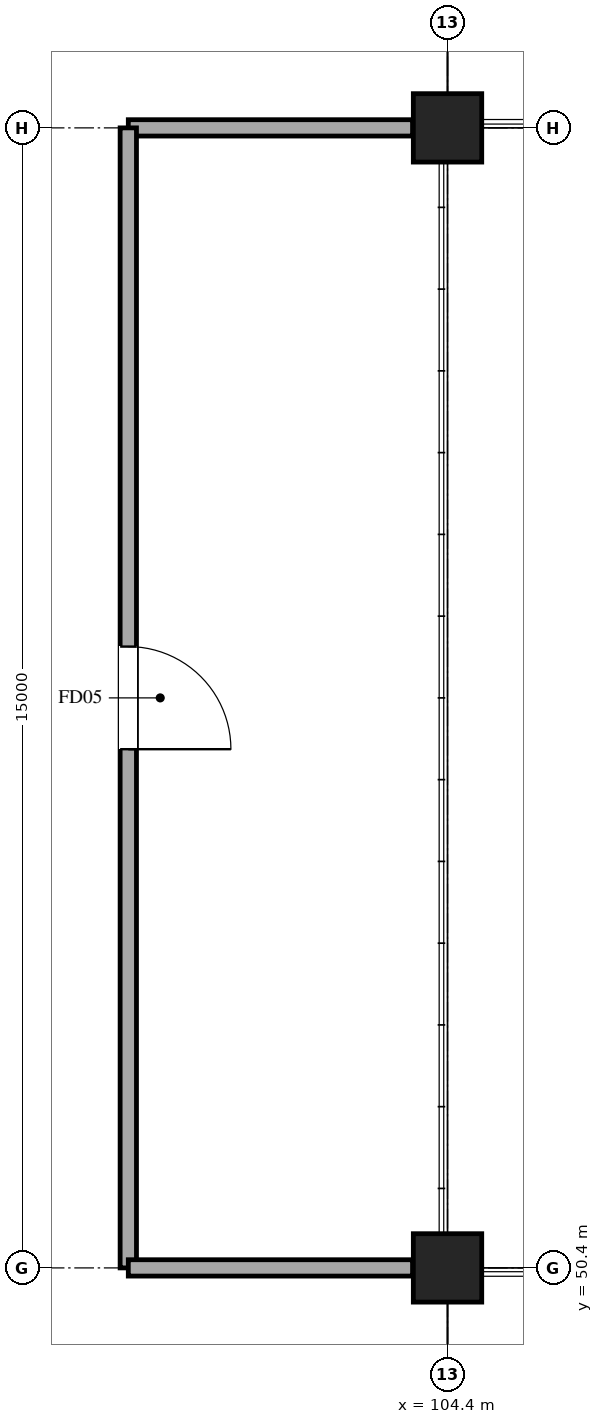
"""IFC4 building model, lengths in metres.
Left out: names, types, materials, properties, quantities, classifications, styles, units other than length and angle.
Written with IfcOpenShell. Run it as: python <this file> out.ifc"""

import sys

from ifc_helpers import new_model, si_unit, direction, frame, frame_2d, origin, origin_2d, place, context, subcontext, project, spatial, rectangle, extrude, element, fill, save


model = new_model("IFC4")
c1 = context("Model", 3, precision=1e-05, world=origin(), true_north=direction((0.0, 1.0)))
c2 = subcontext(c1, "Body", "Model", "MODEL_VIEW")
j1 = project(units=[si_unit("LENGTHUNIT", "METRE"), si_unit("PLANEANGLEUNIT", "RADIAN")], contexts=[c1])
p1 = place(None, origin())
s1 = spatial("IfcSite", under=j1, at=p1, CompositionType="ELEMENT")
p2 = place(p1, origin())
s2 = spatial("IfcBuilding", under=s1, at=p2, CompositionType="ELEMENT")
p3 = place(p2, frame((0.0, 0.0, 11.4)))
s3 = spatial("IfcBuildingStorey", under=s2, at=p3, CompositionType="ELEMENT", Elevation=11.4)
for number, where, z_axis, x_axis in (
    (1, (104.4, 50.4, 0.0), (0.0, 0.0, 1.0), (1.0, 0.0, 0.0)),
    (2, (104.4, 65.4, 0.0), (0.0, 0.0, 1.0), (1.0, 0.0, 0.0)),
):
    element("IfcColumn", number, at=place(p3, frame(where, z_axis=z_axis, x_axis=x_axis)), inside=s3, PredefinedType="COLUMN", context=c2, shape_type="SweptSolid", body=[
        extrude(rectangle(XDim=0.9, YDim=0.9, at=origin_2d()), origin(), (0.0, 0.0, 1.0), 5.1),
    ])
p4 = place(p3, frame((103.94, 65.4, 0.0), z_axis=(0.0, 0.0, 1.0), x_axis=(-1.0, 0.0, 0.0)))
e3 = element("IfcWall", 3, at=p4, inside=s3, PredefinedType="PARTITIONING", context=c2, shape_type="SweptSolid", body=[
    extrude(rectangle(XDim=3.74, YDim=0.215, at=frame_2d((1.87, 0.0))), origin(), (0.0, 0.0, 1.0), 3.86),
])
p5 = place(p3, frame((100.2, 65.4, 0.0), z_axis=(0.0, 0.0, 1.0), x_axis=(0.0, -1.0, 0.0)))
e4 = element("IfcWall", 4, at=p5, inside=s3, PredefinedType="PARTITIONING", context=c2, shape_type="SweptSolid", body=[
    extrude(rectangle(XDim=15.0, YDim=0.215, at=frame_2d((7.5, 0.0))), origin(), (0.0, 0.0, 1.0), 3.86),
])
p6 = place(p5, frame((6.825, 0.0, 0.0)))
e5 = element("IfcOpeningElement", 5, at=p6, cuts=e4, PredefinedType="OPENING", context=c2, shape_type="SweptSolid", body=[
    extrude(rectangle(XDim=1.35, YDim=2.2, at=frame_2d((0.675, 1.1))), frame((0.0, 0.118, 0.0), z_axis=(0.0, -1.0, 0.0), x_axis=(1.0, 0.0, 0.0)), (0.0, 0.0, 1.0), 0.235),
])
p7 = place(p3, frame((100.2, 50.4, 0.0), z_axis=(0.0, 0.0, 1.0), x_axis=(1.0, 0.0, 0.0)))
e6 = element("IfcWall", 6, at=p7, inside=s3, PredefinedType="PARTITIONING", context=c2, shape_type="SweptSolid", body=[
    extrude(rectangle(XDim=3.74, YDim=0.215, at=frame_2d((1.87, 0.0))), origin(), (0.0, 0.0, 1.0), 3.86),
])
p8 = place(p6, origin())
e7 = element("IfcDoor", 7, at=p8, inside=s3, OperationType="SINGLE_SWING_RIGHT", PredefinedType="DOOR", context=c2, shape_type="SweptSolid", body=[
    extrude(rectangle(XDim=1.35, YDim=2.2, at=frame_2d((0.675, 1.1))), frame((0.0, 0.025, 0.0), z_axis=(0.0, -1.0, 0.0), x_axis=(1.0, 0.0, 0.0)), (0.0, 0.0, 1.0), 0.05),
])
fill(e5, e7)
save(model, sys.argv[1])
